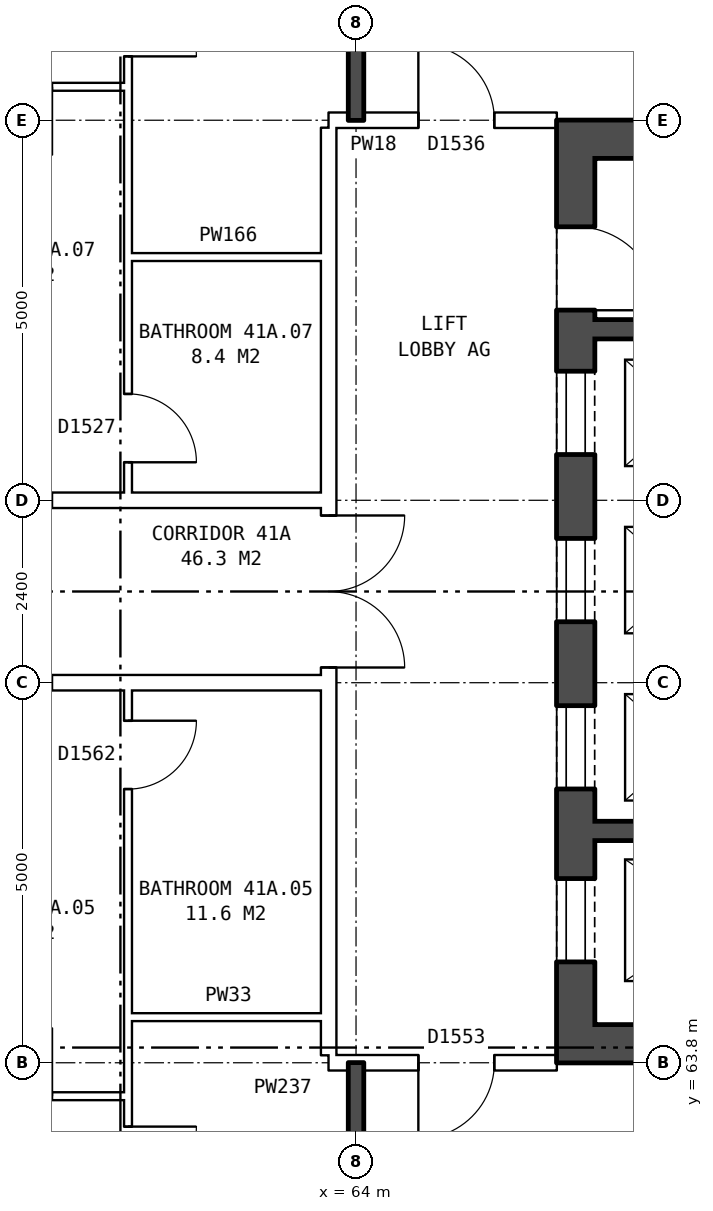
"""IFC4 building model, lengths in metres.
Left out: names, types, materials, properties, quantities, classifications, styles, units other than length and angle.
Written with IfcOpenShell. Run it as: python <this file> out.ifc"""

import sys

from ifc_helpers import new_model, si_unit, direction, frame, frame_2d, origin, place, context, subcontext, project, spatial, rectangle, extrude, element, fill, save


model = new_model("IFC4")
c1 = context("Model", 3, precision=1e-05, world=origin(), true_north=direction((0.0, 1.0)))
c2 = subcontext(c1, "Body", "Model", "MODEL_VIEW")
j1 = project(units=[si_unit("LENGTHUNIT", "METRE"), si_unit("PLANEANGLEUNIT", "RADIAN")], contexts=[c1])
p1 = place(None, origin())
s1 = spatial("IfcSite", under=j1, at=p1, CompositionType="ELEMENT")
p2 = place(p1, origin())
s2 = spatial("IfcBuilding", under=s1, at=p2, CompositionType="ELEMENT")
p3 = place(p2, frame((0.0, 0.0, 148.5)))
s3 = spatial("IfcBuildingStorey", under=s2, at=p3, CompositionType="ELEMENT", Elevation=148.5)
p4 = place(p3, frame((66.89, 63.8, 0.0), z_axis=(0.0, 0.0, 1.0), x_axis=(0.0, 1.0, 0.0)))
e1 = element("IfcWall", 1, at=p4, inside=s3, PredefinedType="SHEAR", context=c2, shape_type="SweptSolid", body=[
    extrude(rectangle(XDim=12.4, YDim=0.5, at=frame_2d((6.2, 0.0))), origin(), (0.0, 0.0, 1.0), 2.85),
])
p5 = place(p4, frame((1.325, 0.0, 0.0)))
e2 = element("IfcOpeningElement", 2, at=p5, cuts=e1, PredefinedType="OPENING", context=c2, shape_type="SweptSolid", body=[
    extrude(rectangle(XDim=1.1, YDim=2.1, at=frame_2d((0.55, 1.05))), frame((0.0, 0.26, 0.0), z_axis=(0.0, -1.0, 0.0), x_axis=(1.0, 0.0, 0.0)), (0.0, 0.0, 1.0), 0.52),
])
p6 = place(p4, frame((3.6, 0.0, 0.0)))
e3 = element("IfcOpeningElement", 3, at=p6, cuts=e1, PredefinedType="OPENING", context=c2, shape_type="SweptSolid", body=[
    extrude(rectangle(XDim=1.1, YDim=2.1, at=frame_2d((0.55, 1.05))), frame((0.0, 0.26, 0.0), z_axis=(0.0, -1.0, 0.0), x_axis=(1.0, 0.0, 0.0)), (0.0, 0.0, 1.0), 0.52),
])
p7 = place(p4, frame((5.8, 0.0, 0.0)))
e4 = element("IfcOpeningElement", 4, at=p7, cuts=e1, PredefinedType="OPENING", context=c2, shape_type="SweptSolid", body=[
    extrude(rectangle(XDim=1.1, YDim=2.1, at=frame_2d((0.55, 1.05))), frame((0.0, 0.26, 0.0), z_axis=(0.0, -1.0, 0.0), x_axis=(1.0, 0.0, 0.0)), (0.0, 0.0, 1.0), 0.52),
])
p8 = place(p4, frame((8.0, 0.0, 0.0)))
e5 = element("IfcOpeningElement", 5, at=p8, cuts=e1, PredefinedType="OPENING", context=c2, shape_type="SweptSolid", body=[
    extrude(rectangle(XDim=1.1, YDim=2.1, at=frame_2d((0.55, 1.05))), frame((0.0, 0.26, 0.0), z_axis=(0.0, -1.0, 0.0), x_axis=(1.0, 0.0, 0.0)), (0.0, 0.0, 1.0), 0.52),
])
p9 = place(p4, frame((9.9, 0.0, 0.0)))
e6 = element("IfcOpeningElement", 6, at=p9, cuts=e1, PredefinedType="OPENING", context=c2, shape_type="SweptSolid", body=[
    extrude(rectangle(XDim=1.1, YDim=2.1, at=frame_2d((0.55, 1.05))), frame((0.0, 0.26, 0.0), z_axis=(0.0, -1.0, 0.0), x_axis=(1.0, 0.0, 0.0)), (0.0, 0.0, 1.0), 0.52),
])
for number, where, z_axis, x_axis in (
    (7, (67.14, 64.05, 0.0), (0.0, 0.0, 1.0), (1.0, 0.0, 0.0)),
    (8, (67.14, 75.95, 0.0), (0.0, 0.0, 1.0), (1.0, 0.0, 0.0)),
):
    element("IfcWall", number, at=place(p3, frame(where, z_axis=z_axis, x_axis=x_axis)), inside=s3, PredefinedType="SHEAR", context=c2, shape_type="SweptSolid", body=[
        extrude(rectangle(XDim=8.0, YDim=0.5, at=frame_2d((4.0, 0.0))), origin(), (0.0, 0.0, 1.0), 2.85),
    ])
p10 = place(p3, frame((67.14, 66.85, 0.0), z_axis=(0.0, 0.0, 1.0), x_axis=(1.0, 0.0, 0.0)))
e9 = element("IfcWall", 9, at=p10, inside=s3, PredefinedType="SHEAR", context=c2, shape_type="SweptSolid", body=[
    extrude(rectangle(XDim=3.495, YDim=0.25, at=frame_2d((1.748, 0.0))), origin(), (0.0, 0.0, 1.0), 2.85),
])
p11 = place(p3, frame((67.14, 73.45, 0.0), z_axis=(0.0, 0.0, 1.0), x_axis=(1.0, 0.0, 0.0)))
e10 = element("IfcWall", 10, at=p11, inside=s3, PredefinedType="SHEAR", context=c2, shape_type="SweptSolid", body=[
    extrude(rectangle(XDim=2.425, YDim=0.25, at=frame_2d((1.212, 0.0))), origin(), (0.0, 0.0, 1.0), 2.85),
])
p12 = place(p3, frame((63.64, 63.9, 0.0), z_axis=(0.0, 0.0, 1.0), x_axis=(0.0, 1.0, 0.0)))
e11 = element("IfcWall", 11, at=p12, inside=s3, PredefinedType="PARTITIONING", context=c2, shape_type="SweptSolid", body=[
    extrude(rectangle(XDim=12.2, YDim=0.2, at=frame_2d((6.1, 0.0))), origin(), (0.0, 0.0, 1.0), 2.85),
])
p13 = place(p12, frame((5.1, 0.0, 0.0)))
e12 = element("IfcOpeningElement", 12, at=p13, cuts=e11, PredefinedType="OPENING", context=c2, shape_type="SweptSolid", body=[
    extrude(rectangle(XDim=2.0, YDim=2.1, at=frame_2d((1.0, 1.05))), frame((0.0, 0.11, 0.0), z_axis=(0.0, -1.0, 0.0), x_axis=(1.0, 0.0, 0.0)), (0.0, 0.0, 1.0), 0.22),
])
p14 = place(p3, frame((58.1, 63.36, 0.0), z_axis=(0.0, 0.0, 1.0), x_axis=(1.0, 0.0, 0.0)))
e13 = element("IfcWall", 13, at=p14, inside=s3, PredefinedType="PARTITIONING", context=c2, shape_type="SweptSolid", body=[
    extrude(rectangle(XDim=2.9, YDim=0.1, at=frame_2d((1.45, 0.0))), origin(), (0.0, 0.0, 1.0), 2.85),
])
p15 = place(p14, frame((1.0, 0.0, 0.0)))
e14 = element("IfcOpeningElement", 14, at=p15, cuts=e13, PredefinedType="OPENING", context=c2, shape_type="SweptSolid", body=[
    extrude(rectangle(XDim=0.9, YDim=2.1, at=frame_2d((0.45, 1.05))), frame((0.0, 0.06, 0.0), z_axis=(0.0, -1.0, 0.0), x_axis=(1.0, 0.0, 0.0)), (0.0, 0.0, 1.0), 0.12),
])
p16 = place(p3, frame((63.64, 63.8, 0.0), z_axis=(0.0, 0.0, 1.0), x_axis=(1.0, 0.0, 0.0)))
e15 = element("IfcWall", 15, at=p16, inside=s3, PredefinedType="PARTITIONING", context=c2, shape_type="SweptSolid", body=[
    extrude(rectangle(XDim=3.0, YDim=0.2, at=frame_2d((1.5, 0.0))), origin(), (0.0, 0.0, 1.0), 2.85),
])
p17 = place(p16, frame((1.18, 0.0, 0.0)))
e16 = element("IfcOpeningElement", 16, at=p17, cuts=e15, PredefinedType="OPENING", context=c2, shape_type="SweptSolid", body=[
    extrude(rectangle(XDim=1.0, YDim=2.1, at=frame_2d((0.5, 1.05))), frame((0.0, 0.11, 0.0), z_axis=(0.0, -1.0, 0.0), x_axis=(1.0, 0.0, 0.0)), (0.0, 0.0, 1.0), 0.22),
])
p18 = place(p3, frame((61.0, 64.4, 0.0), z_axis=(0.0, 0.0, 1.0), x_axis=(1.0, 0.0, 0.0)))
e17 = element("IfcWall", 17, at=p18, inside=s3, PredefinedType="PARTITIONING", context=c2, shape_type="SweptSolid", body=[
    extrude(rectangle(XDim=2.64, YDim=0.1, at=frame_2d((1.32, 0.0))), origin(), (0.0, 0.0, 1.0), 2.85),
])
p19 = place(p3, frame((44.36, 68.8, 0.0), z_axis=(0.0, 0.0, 1.0), x_axis=(1.0, 0.0, 0.0)))
e18 = element("IfcWall", 18, at=p19, inside=s3, PredefinedType="PARTITIONING", context=c2, shape_type="SweptSolid", body=[
    extrude(rectangle(XDim=19.28, YDim=0.2, at=frame_2d((9.64, 0.0))), origin(), (0.0, 0.0, 1.0), 2.85),
])
p20 = place(p19, frame((14.64, 0.0, 0.0)))
e19 = element("IfcOpeningElement", 19, at=p20, cuts=e18, PredefinedType="OPENING", context=c2, shape_type="SweptSolid", body=[
    extrude(rectangle(XDim=1.0, YDim=2.1, at=frame_2d((0.5, 1.05))), frame((0.0, 0.11, 0.0), z_axis=(0.0, -1.0, 0.0), x_axis=(1.0, 0.0, 0.0)), (0.0, 0.0, 1.0), 0.22),
])
p21 = place(p19, frame((5.64, 0.0, 0.0)))
e20 = element("IfcOpeningElement", 20, at=p21, cuts=e18, PredefinedType="OPENING", context=c2, shape_type="SweptSolid", body=[
    extrude(rectangle(XDim=1.0, YDim=2.1, at=frame_2d((0.5, 1.05))), frame((0.0, 0.11, 0.0), z_axis=(0.0, -1.0, 0.0), x_axis=(1.0, 0.0, 0.0)), (0.0, 0.0, 1.0), 0.22),
])
p22 = place(p3, frame((44.36, 71.2, 0.0), z_axis=(0.0, 0.0, 1.0), x_axis=(1.0, 0.0, 0.0)))
e21 = element("IfcWall", 21, at=p22, inside=s3, PredefinedType="PARTITIONING", context=c2, shape_type="SweptSolid", body=[
    extrude(rectangle(XDim=19.28, YDim=0.2, at=frame_2d((9.64, 0.0))), origin(), (0.0, 0.0, 1.0), 2.85),
])
p23 = place(p22, frame((14.64, 0.0, 0.0)))
e22 = element("IfcOpeningElement", 22, at=p23, cuts=e21, PredefinedType="OPENING", context=c2, shape_type="SweptSolid", body=[
    extrude(rectangle(XDim=1.0, YDim=2.1, at=frame_2d((0.5, 1.05))), frame((0.0, 0.11, 0.0), z_axis=(0.0, -1.0, 0.0), x_axis=(1.0, 0.0, 0.0)), (0.0, 0.0, 1.0), 0.22),
])
p24 = place(p22, frame((5.64, 0.0, 0.0)))
e23 = element("IfcOpeningElement", 23, at=p24, cuts=e21, PredefinedType="OPENING", context=c2, shape_type="SweptSolid", body=[
    extrude(rectangle(XDim=1.0, YDim=2.1, at=frame_2d((0.5, 1.05))), frame((0.0, 0.11, 0.0), z_axis=(0.0, -1.0, 0.0), x_axis=(1.0, 0.0, 0.0)), (0.0, 0.0, 1.0), 0.22),
])
p25 = place(p3, frame((61.0, 74.4, 0.0), z_axis=(0.0, 0.0, 1.0), x_axis=(1.0, 0.0, 0.0)))
e24 = element("IfcWall", 24, at=p25, inside=s3, PredefinedType="PARTITIONING", context=c2, shape_type="SweptSolid", body=[
    extrude(rectangle(XDim=2.64, YDim=0.1, at=frame_2d((1.32, 0.0))), origin(), (0.0, 0.0, 1.0), 2.85),
])
p26 = place(p3, frame((63.64, 76.2, 0.0), z_axis=(0.0, 0.0, 1.0), x_axis=(1.0, 0.0, 0.0)))
e25 = element("IfcWall", 25, at=p26, inside=s3, PredefinedType="PARTITIONING", context=c2, shape_type="SweptSolid", body=[
    extrude(rectangle(XDim=3.0, YDim=0.2, at=frame_2d((1.5, 0.0))), origin(), (0.0, 0.0, 1.0), 2.85),
])
p27 = place(p26, frame((1.18, 0.0, 0.0)))
e26 = element("IfcOpeningElement", 26, at=p27, cuts=e25, PredefinedType="OPENING", context=c2, shape_type="SweptSolid", body=[
    extrude(rectangle(XDim=1.0, YDim=2.1, at=frame_2d((0.5, 1.05))), frame((0.0, 0.11, 0.0), z_axis=(0.0, -1.0, 0.0), x_axis=(1.0, 0.0, 0.0)), (0.0, 0.0, 1.0), 0.22),
])
p28 = place(p3, frame((58.1, 76.64, 0.0), z_axis=(0.0, 0.0, 1.0), x_axis=(1.0, 0.0, 0.0)))
e27 = element("IfcWall", 27, at=p28, inside=s3, PredefinedType="PARTITIONING", context=c2, shape_type="SweptSolid", body=[
    extrude(rectangle(XDim=2.9, YDim=0.1, at=frame_2d((1.45, 0.0))), origin(), (0.0, 0.0, 1.0), 2.85),
])
p29 = place(p28, frame((1.0, 0.0, 0.0)))
e28 = element("IfcOpeningElement", 28, at=p29, cuts=e27, PredefinedType="OPENING", context=c2, shape_type="SweptSolid", body=[
    extrude(rectangle(XDim=0.9, YDim=2.1, at=frame_2d((0.45, 1.05))), frame((0.0, 0.06, 0.0), z_axis=(0.0, -1.0, 0.0), x_axis=(1.0, 0.0, 0.0)), (0.0, 0.0, 1.0), 0.12),
])
p30 = place(p3, frame((61.0, 54.36, 0.0), z_axis=(0.0, 0.0, 1.0), x_axis=(0.0, 1.0, 0.0)))
e29 = element("IfcWall", 29, at=p30, inside=s3, PredefinedType="PARTITIONING", context=c2, shape_type="SweptSolid", body=[
    extrude(rectangle(XDim=14.34, YDim=0.1, at=frame_2d((7.17, 0.0))), origin(), (0.0, 0.0, 1.0), 2.85),
])
p31 = place(p30, frame((7.7, 0.0, 0.0)))
e30 = element("IfcOpeningElement", 30, at=p31, cuts=e29, PredefinedType="OPENING", context=c2, shape_type="SweptSolid", body=[
    extrude(rectangle(XDim=0.9, YDim=2.1, at=frame_2d((0.45, 1.05))), frame((0.0, 0.06, 0.0), z_axis=(0.0, -1.0, 0.0), x_axis=(1.0, 0.0, 0.0)), (0.0, 0.0, 1.0), 0.12),
])
p32 = place(p30, frame((13.04, 0.0, 0.0)))
e31 = element("IfcOpeningElement", 31, at=p32, cuts=e29, PredefinedType="OPENING", context=c2, shape_type="SweptSolid", body=[
    extrude(rectangle(XDim=0.9, YDim=2.1, at=frame_2d((0.45, 1.05))), frame((0.0, 0.06, 0.0), z_axis=(0.0, -1.0, 0.0), x_axis=(1.0, 0.0, 0.0)), (0.0, 0.0, 1.0), 0.12),
])
p33 = place(p3, frame((61.0, 71.3, 0.0), z_axis=(0.0, 0.0, 1.0), x_axis=(0.0, 1.0, 0.0)))
e32 = element("IfcWall", 32, at=p33, inside=s3, PredefinedType="PARTITIONING", context=c2, shape_type="SweptSolid", body=[
    extrude(rectangle(XDim=14.34, YDim=0.1, at=frame_2d((7.17, 0.0))), origin(), (0.0, 0.0, 1.0), 2.85),
])
p34 = place(p33, frame((5.74, 0.0, 0.0)))
e33 = element("IfcOpeningElement", 33, at=p34, cuts=e32, PredefinedType="OPENING", context=c2, shape_type="SweptSolid", body=[
    extrude(rectangle(XDim=0.9, YDim=2.1, at=frame_2d((0.45, 1.05))), frame((0.0, 0.06, 0.0), z_axis=(0.0, -1.0, 0.0), x_axis=(1.0, 0.0, 0.0)), (0.0, 0.0, 1.0), 0.12),
])
p35 = place(p33, frame((0.4, 0.0, 0.0)))
e34 = element("IfcOpeningElement", 34, at=p35, cuts=e32, PredefinedType="OPENING", context=c2, shape_type="SweptSolid", body=[
    extrude(rectangle(XDim=0.9, YDim=2.1, at=frame_2d((0.45, 1.05))), frame((0.0, 0.06, 0.0), z_axis=(0.0, -1.0, 0.0), x_axis=(1.0, 0.0, 0.0)), (0.0, 0.0, 1.0), 0.12),
])
for number, where, z_axis, x_axis in (
    (35, (64.0, 54.36, 0.0), (0.0, 0.0, 1.0), (0.0, 1.0, 0.0)),
    (36, (64.0, 76.2, 0.0), (0.0, 0.0, 1.0), (0.0, 1.0, 0.0)),
):
    element("IfcWall", number, at=place(p3, frame(where, z_axis=z_axis, x_axis=x_axis)), inside=s3, PredefinedType="SOLIDWALL", context=c2, shape_type="SweptSolid", body=[
        extrude(rectangle(XDim=9.44, YDim=0.2, at=frame_2d((4.72, 0.0))), origin(), (0.0, 0.0, 1.0), 2.85),
    ])
p36 = place(p5, origin())
e37 = element("IfcDoor", 37, at=p36, inside=s3, OperationType="DOUBLE_DOOR_SLIDING", PredefinedType="DOOR", context=c2, shape_type="SweptSolid", body=[
    extrude(rectangle(XDim=1.1, YDim=2.1, at=frame_2d((0.55, 1.05))), frame((0.0, -0.185, 0.0), z_axis=(0.0, -1.0, 0.0), x_axis=(1.0, 0.0, 0.0)), (0.0, 0.0, 1.0), 0.05),
])
fill(e2, e37)
p37 = place(p6, origin())
e38 = element("IfcDoor", 38, at=p37, inside=s3, OperationType="DOUBLE_DOOR_SLIDING", PredefinedType="DOOR", context=c2, shape_type="SweptSolid", body=[
    extrude(rectangle(XDim=1.1, YDim=2.1, at=frame_2d((0.55, 1.05))), frame((0.0, -0.185, 0.0), z_axis=(0.0, -1.0, 0.0), x_axis=(1.0, 0.0, 0.0)), (0.0, 0.0, 1.0), 0.05),
])
fill(e3, e38)
p38 = place(p7, origin())
e39 = element("IfcDoor", 39, at=p38, inside=s3, OperationType="DOUBLE_DOOR_SLIDING", PredefinedType="DOOR", context=c2, shape_type="SweptSolid", body=[
    extrude(rectangle(XDim=1.1, YDim=2.1, at=frame_2d((0.55, 1.05))), frame((0.0, -0.185, 0.0), z_axis=(0.0, -1.0, 0.0), x_axis=(1.0, 0.0, 0.0)), (0.0, 0.0, 1.0), 0.05),
])
fill(e4, e39)
p39 = place(p8, origin())
e40 = element("IfcDoor", 40, at=p39, inside=s3, OperationType="DOUBLE_DOOR_SLIDING", PredefinedType="DOOR", context=c2, shape_type="SweptSolid", body=[
    extrude(rectangle(XDim=1.1, YDim=2.1, at=frame_2d((0.55, 1.05))), frame((0.0, -0.185, 0.0), z_axis=(0.0, -1.0, 0.0), x_axis=(1.0, 0.0, 0.0)), (0.0, 0.0, 1.0), 0.05),
])
fill(e5, e40)
p40 = place(p9, frame((1.1, 0.0, 0.0), z_axis=(0.0, 0.0, 1.0), x_axis=(-1.0, 0.0, 0.0)))
e41 = element("IfcDoor", 41, at=p40, inside=s3, OperationType="SINGLE_SWING_RIGHT", PredefinedType="DOOR", context=c2, shape_type="SweptSolid", body=[
    extrude(rectangle(XDim=1.1, YDim=2.1, at=frame_2d((0.55, 1.05))), frame((0.0, 0.235, 0.0), z_axis=(0.0, -1.0, 0.0), x_axis=(1.0, 0.0, 0.0)), (0.0, 0.0, 1.0), 0.05),
])
fill(e6, e41)
p41 = place(p13, frame((2.0, 0.0, 0.0), z_axis=(0.0, 0.0, 1.0), x_axis=(-1.0, 0.0, 0.0)))
e42 = element("IfcDoor", 42, at=p41, inside=s3, OperationType="DOUBLE_DOOR_SINGLE_SWING", PredefinedType="DOOR", context=c2, shape_type="SweptSolid", body=[
    extrude(rectangle(XDim=2.0, YDim=2.1, at=frame_2d((1.0, 1.05))), frame((0.0, 0.025, 0.0), z_axis=(0.0, -1.0, 0.0), x_axis=(1.0, 0.0, 0.0)), (0.0, 0.0, 1.0), 0.05),
])
fill(e12, e42)
p42 = place(p17, frame((1.0, 0.0, 0.0), z_axis=(0.0, 0.0, 1.0), x_axis=(-1.0, 0.0, 0.0)))
e43 = element("IfcDoor", 43, at=p42, inside=s3, OperationType="SINGLE_SWING_RIGHT", PredefinedType="DOOR", context=c2, shape_type="SweptSolid", body=[
    extrude(rectangle(XDim=1.0, YDim=2.1, at=frame_2d((0.5, 1.05))), frame((0.0, 0.025, 0.0), z_axis=(0.0, -1.0, 0.0), x_axis=(1.0, 0.0, 0.0)), (0.0, 0.0, 1.0), 0.05),
])
fill(e16, e43)
p43 = place(p27, origin())
e44 = element("IfcDoor", 44, at=p43, inside=s3, OperationType="SINGLE_SWING_LEFT", PredefinedType="DOOR", context=c2, shape_type="SweptSolid", body=[
    extrude(rectangle(XDim=1.0, YDim=2.1, at=frame_2d((0.5, 1.05))), frame((0.0, 0.025, 0.0), z_axis=(0.0, -1.0, 0.0), x_axis=(1.0, 0.0, 0.0)), (0.0, 0.0, 1.0), 0.05),
])
fill(e26, e44)
p44 = place(p31, frame((0.9, 0.0, 0.0), z_axis=(0.0, 0.0, 1.0), x_axis=(-1.0, 0.0, 0.0)))
e45 = element("IfcDoor", 45, at=p44, inside=s3, OperationType="SINGLE_SWING_LEFT", PredefinedType="DOOR", context=c2, shape_type="SweptSolid", body=[
    extrude(rectangle(XDim=0.9, YDim=2.1, at=frame_2d((0.45, 1.05))), frame((0.0, 0.025, 0.0), z_axis=(0.0, -1.0, 0.0), x_axis=(1.0, 0.0, 0.0)), (0.0, 0.0, 1.0), 0.05),
])
fill(e30, e45)
p45 = place(p32, frame((0.9, 0.0, 0.0), z_axis=(0.0, 0.0, 1.0), x_axis=(-1.0, 0.0, 0.0)))
e46 = element("IfcDoor", 46, at=p45, inside=s3, OperationType="SINGLE_SWING_LEFT", PredefinedType="DOOR", context=c2, shape_type="SweptSolid", body=[
    extrude(rectangle(XDim=0.9, YDim=2.1, at=frame_2d((0.45, 1.05))), frame((0.0, 0.025, 0.0), z_axis=(0.0, -1.0, 0.0), x_axis=(1.0, 0.0, 0.0)), (0.0, 0.0, 1.0), 0.05),
])
fill(e31, e46)
p46 = place(p34, frame((0.9, 0.0, 0.0), z_axis=(0.0, 0.0, 1.0), x_axis=(-1.0, 0.0, 0.0)))
e47 = element("IfcDoor", 47, at=p46, inside=s3, OperationType="SINGLE_SWING_RIGHT", PredefinedType="DOOR", context=c2, shape_type="SweptSolid", body=[
    extrude(rectangle(XDim=0.9, YDim=2.1, at=frame_2d((0.45, 1.05))), frame((0.0, 0.025, 0.0), z_axis=(0.0, -1.0, 0.0), x_axis=(1.0, 0.0, 0.0)), (0.0, 0.0, 1.0), 0.05),
])
fill(e33, e47)
p47 = place(p35, frame((0.9, 0.0, 0.0), z_axis=(0.0, 0.0, 1.0), x_axis=(-1.0, 0.0, 0.0)))
e48 = element("IfcDoor", 48, at=p47, inside=s3, OperationType="SINGLE_SWING_RIGHT", PredefinedType="DOOR", context=c2, shape_type="SweptSolid", body=[
    extrude(rectangle(XDim=0.9, YDim=2.1, at=frame_2d((0.45, 1.05))), frame((0.0, 0.025, 0.0), z_axis=(0.0, -1.0, 0.0), x_axis=(1.0, 0.0, 0.0)), (0.0, 0.0, 1.0), 0.05),
])
fill(e34, e48)
save(model, sys.argv[1])
